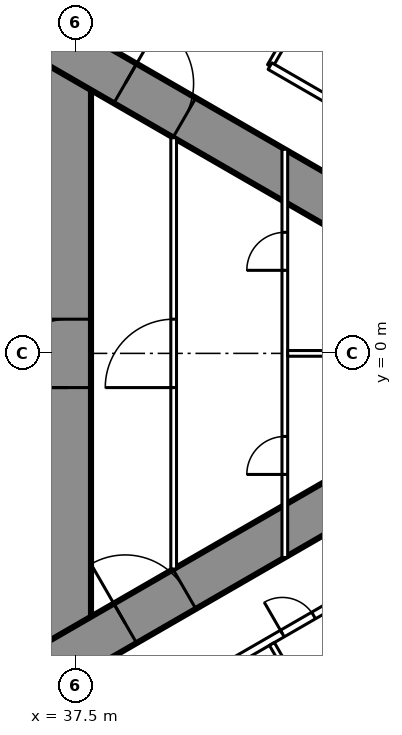
"""IFC4 building model, lengths in metres.
Left out: names, types, materials, properties, quantities, classifications, styles, units other than length and angle.
Written with IfcOpenShell. Run it as: python <this file> out.ifc"""

import sys

from ifc_helpers import new_model, si_unit, direction, frame, frame_2d, origin, place, context, subcontext, project, spatial, rectangle, extrude, element, fill, save


model = new_model("IFC4")
c1 = context("Model", 3, precision=1e-05, world=origin(), true_north=direction((0.0, 1.0)))
c2 = subcontext(c1, "Body", "Model", "MODEL_VIEW")
j1 = project(units=[si_unit("LENGTHUNIT", "METRE"), si_unit("PLANEANGLEUNIT", "RADIAN")], contexts=[c1])
p1 = place(None, origin())
s1 = spatial("IfcSite", under=j1, at=p1, CompositionType="ELEMENT")
p2 = place(p1, origin())
s2 = spatial("IfcBuilding", under=s1, at=p2, CompositionType="ELEMENT")
p3 = place(p2, frame((0.0, 0.0, 236.9)))
s3 = spatial("IfcBuildingStorey", under=s2, at=p3, CompositionType="ELEMENT", Elevation=236.9)
p4 = place(p3, frame((37.3, -8.6, 0.0), z_axis=(0.0, 0.0, 1.0), x_axis=(0.0, 1.0, 0.0)))
e1 = element("IfcWall", 1, at=p4, inside=s3, PredefinedType="SHEAR", context=c2, shape_type="SweptSolid", body=[
    extrude(rectangle(XDim=17.2, YDim=1.2, at=frame_2d((8.6, 0.0))), origin(), (0.0, 0.0, 1.0), 3.6),
])
p5 = place(p4, frame((7.7, 0.0, 0.0)))
e2 = element("IfcOpeningElement", 2, at=p5, cuts=e1, PredefinedType="OPENING", context=c2, shape_type="SweptSolid", body=[
    extrude(rectangle(XDim=1.8, YDim=2.2, at=frame_2d((0.9, 1.1))), frame((0.0, 0.61, 0.0), z_axis=(0.0, -1.0, 0.0), x_axis=(1.0, 0.0, 0.0)), (0.0, 0.0, 1.0), 1.22),
])
p6 = place(p3, frame((27.2, -13.8, 0.0), z_axis=(0.0, 0.0, 1.0), x_axis=(0.866027159892, 0.499996958321, 0.0)))
e3 = element("IfcWall", 3, at=p6, inside=s3, PredefinedType="SHEAR", context=c2, shape_type="SweptSolid", body=[
    extrude(rectangle(XDim=27.947, YDim=1.2, at=frame_2d((13.973, 0.0))), origin(), (0.0, 0.0, 1.0), 3.6),
])
p7 = place(p6, frame((4.6, 0.0, 0.0)))
e4 = element("IfcOpeningElement", 4, at=p7, cuts=e3, PredefinedType="OPENING", context=c2, shape_type="SweptSolid", body=[
    extrude(rectangle(XDim=1.0, YDim=2.2, at=frame_2d((0.5, 1.1))), frame((0.0, 0.61, 0.0), z_axis=(0.0, -1.0, 0.0), x_axis=(1.0, 0.0, 0.0)), (0.0, 0.0, 1.0), 1.22),
])
p8 = place(p6, frame((13.395, 0.0, 0.0)))
e5 = element("IfcOpeningElement", 5, at=p8, cuts=e3, PredefinedType="OPENING", context=c2, shape_type="SweptSolid", body=[
    extrude(rectangle(XDim=1.8, YDim=2.2, at=frame_2d((0.9, 1.1))), frame((0.0, 0.61, 0.0), z_axis=(0.0, -1.0, 0.0), x_axis=(1.0, 0.0, 0.0)), (0.0, 0.0, 1.0), 1.22),
])
p9 = place(p3, frame((27.2, 13.8, 0.0), z_axis=(0.0, 0.0, 1.0), x_axis=(0.866024515034, -0.500001539357, 0.0)))
e6 = element("IfcWall", 6, at=p9, inside=s3, PredefinedType="SHEAR", context=c2, shape_type="SweptSolid", body=[
    extrude(rectangle(XDim=26.907, YDim=1.2, at=frame_2d((13.454, 0.0))), origin(), (0.0, 0.0, 1.0), 3.6),
])
p10 = place(p9, frame((4.6, 0.0, 0.0)))
e7 = element("IfcOpeningElement", 7, at=p10, cuts=e6, PredefinedType="OPENING", context=c2, shape_type="SweptSolid", body=[
    extrude(rectangle(XDim=1.0, YDim=2.2, at=frame_2d((0.5, 1.1))), frame((0.0, 0.61, 0.0), z_axis=(0.0, -1.0, 0.0), x_axis=(1.0, 0.0, 0.0)), (0.0, 0.0, 1.0), 1.22),
])
p11 = place(p9, frame((13.395, 0.0, 0.0)))
e8 = element("IfcOpeningElement", 8, at=p11, cuts=e6, PredefinedType="OPENING", context=c2, shape_type="SweptSolid", body=[
    extrude(rectangle(XDim=1.8, YDim=2.2, at=frame_2d((0.9, 1.1))), frame((0.0, 0.61, 0.0), z_axis=(0.0, -1.0, 0.0), x_axis=(1.0, 0.0, 0.0)), (0.0, 0.0, 1.0), 1.22),
])
p12 = place(p3, frame((28.959, -15.44, 0.0), z_axis=(0.0, 0.0, 1.0), x_axis=(0.866025227435, 0.500000305447, 0.0)))
e9 = element("IfcWall", 9, at=p12, inside=s3, PredefinedType="PARTITIONING", context=c2, shape_type="SweptSolid", body=[
    extrude(rectangle(XDim=30.88, YDim=0.2, at=frame_2d((15.44, 0.0))), origin(), (0.0, 0.0, 1.0), 3.35),
])
p13 = place(p12, frame((1.494, 0.0, 0.0)))
e10 = element("IfcOpeningElement", 10, at=p13, cuts=e9, PredefinedType="OPENING", context=c2, shape_type="SweptSolid", body=[
    extrude(rectangle(XDim=1.8, YDim=2.03, at=frame_2d((0.9, 1.015))), frame((0.0, 0.11, 0.0), z_axis=(0.0, -1.0, 0.0), x_axis=(1.0, 0.0, 0.0)), (0.0, 0.0, 1.0), 0.22),
])
p14 = place(p12, frame((7.687, 0.0, 0.0)))
e11 = element("IfcOpeningElement", 11, at=p14, cuts=e9, PredefinedType="OPENING", context=c2, shape_type="SweptSolid", body=[
    extrude(rectangle(XDim=1.0, YDim=2.2, at=frame_2d((0.5, 1.1))), frame((0.0, 0.11, 0.0), z_axis=(0.0, -1.0, 0.0), x_axis=(1.0, 0.0, 0.0)), (0.0, 0.0, 1.0), 0.22),
])
p15 = place(p12, frame((16.137, 0.0, 0.0)))
e12 = element("IfcOpeningElement", 12, at=p15, cuts=e9, PredefinedType="OPENING", context=c2, shape_type="SweptSolid", body=[
    extrude(rectangle(XDim=0.95, YDim=2.2, at=frame_2d((0.475, 1.1))), frame((0.0, 0.11, 0.0), z_axis=(0.0, -1.0, 0.0), x_axis=(1.0, 0.0, 0.0)), (0.0, 0.0, 1.0), 0.22),
])
p16 = place(p12, frame((20.021, 0.0, 0.0)))
e13 = element("IfcOpeningElement", 13, at=p16, cuts=e9, PredefinedType="OPENING", context=c2, shape_type="SweptSolid", body=[
    extrude(rectangle(XDim=0.95, YDim=2.2, at=frame_2d((0.475, 1.1))), frame((0.0, 0.11, 0.0), z_axis=(0.0, -1.0, 0.0), x_axis=(1.0, 0.0, 0.0)), (0.0, 0.0, 1.0), 0.22),
])
p17 = place(p12, frame((26.253, 0.0, 0.0)))
e14 = element("IfcOpeningElement", 14, at=p17, cuts=e9, PredefinedType="OPENING", context=c2, shape_type="SweptSolid", body=[
    extrude(rectangle(XDim=0.95, YDim=2.2, at=frame_2d((0.475, 1.1))), frame((0.0, 0.11, 0.0), z_axis=(0.0, -1.0, 0.0), x_axis=(1.0, 0.0, 0.0)), (0.0, 0.0, 1.0), 0.22),
])
p18 = place(p3, frame((42.66, -7.646, 0.0), z_axis=(0.0, 0.0, 1.0), x_axis=(0.499996592859, -0.866027370889, 0.0)))
e15 = element("IfcWall", 15, at=p18, inside=s3, PredefinedType="PARTITIONING", context=c2, shape_type="SweptSolid", body=[
    extrude(rectangle(XDim=6.398, YDim=0.15, at=frame_2d((3.199, 0.0))), origin(), (0.0, 0.0, 1.0), 2.45),
])
p19 = place(p3, frame((42.61, 7.559, 0.0), z_axis=(0.0, 0.0, 1.0), x_axis=(0.500014058812, 0.866017286774, 0.0)))
e16 = element("IfcWall", 16, at=p19, inside=s3, PredefinedType="PARTITIONING", context=c2, shape_type="SweptSolid", body=[
    extrude(rectangle(XDim=6.498, YDim=0.15, at=frame_2d((3.249, 0.0))), origin(), (0.0, 0.0, 1.0), 2.45),
])
p20 = place(p3, frame((43.425, -8.821, 0.0), z_axis=(0.0, 0.0, 1.0), x_axis=(0.866006523861, 0.500032699561, 0.0)))
e17 = element("IfcWall", 17, at=p20, inside=s3, PredefinedType="PARTITIONING", context=c2, shape_type="SweptSolid", body=[
    extrude(rectangle(XDim=2.475, YDim=0.15, at=frame_2d((1.237, 0.0))), origin(), (0.0, 0.0, 1.0), 3.35),
])
p21 = place(p3, frame((42.61, 7.559, 0.0), z_axis=(0.0, 0.0, 1.0), x_axis=(0.866032081755, -0.499988433238, 0.0)))
e18 = element("IfcWall", 18, at=p21, inside=s3, PredefinedType="PARTITIONING", context=c2, shape_type="SweptSolid", body=[
    extrude(rectangle(XDim=4.741, YDim=0.2, at=frame_2d((2.37, 0.0))), origin(), (0.0, 0.0, 1.0), 3.35),
])
p22 = place(p21, frame((2.725, 0.0, 0.0)))
e19 = element("IfcOpeningElement", 19, at=p22, cuts=e18, PredefinedType="OPENING", context=c2, shape_type="SweptSolid", body=[
    extrude(rectangle(XDim=0.95, YDim=2.2, at=frame_2d((0.475, 1.1))), frame((0.0, 0.11, 0.0), z_axis=(0.0, -1.0, 0.0), x_axis=(1.0, 0.0, 0.0)), (0.0, 0.0, 1.0), 0.22),
])
p23 = place(p3, frame((40.075, -5.674, 0.0), z_axis=(0.0, 0.0, 1.0), x_axis=(0.0, 1.0, 0.0)))
e20 = element("IfcWall", 20, at=p23, inside=s3, PredefinedType="PARTITIONING", context=c2, shape_type="SweptSolid", body=[
    extrude(rectangle(XDim=11.348, YDim=0.15, at=frame_2d((5.674, 0.0))), origin(), (0.0, 0.0, 1.0), 3.35),
])
p24 = place(p23, frame((4.774, 0.0, 0.0)))
e21 = element("IfcOpeningElement", 21, at=p24, cuts=e20, PredefinedType="OPENING", context=c2, shape_type="SweptSolid", body=[
    extrude(rectangle(XDim=1.8, YDim=2.2, at=frame_2d((0.9, 1.1))), frame((0.0, 0.085, 0.0), z_axis=(0.0, -1.0, 0.0), x_axis=(1.0, 0.0, 0.0)), (0.0, 0.0, 1.0), 0.17),
])
p25 = place(p3, frame((43.0, -5.371, 0.0), z_axis=(0.0, 0.0, 1.0), x_axis=(0.0, 1.0, 0.0)))
e22 = element("IfcWall", 22, at=p25, inside=s3, PredefinedType="PARTITIONING", context=c2, shape_type="SweptSolid", body=[
    extrude(rectangle(XDim=10.741, YDim=0.15, at=frame_2d((5.371, 0.0))), origin(), (0.0, 0.0, 1.0), 3.35),
])
p26 = place(p25, frame((2.185, 0.0, 0.0)))
e23 = element("IfcOpeningElement", 23, at=p26, cuts=e22, PredefinedType="OPENING", context=c2, shape_type="SweptSolid", body=[
    extrude(rectangle(XDim=1.0, YDim=2.2, at=frame_2d((0.5, 1.1))), frame((0.0, 0.085, 0.0), z_axis=(0.0, -1.0, 0.0), x_axis=(1.0, 0.0, 0.0)), (0.0, 0.0, 1.0), 0.17),
])
p27 = place(p25, frame((7.556, 0.0, 0.0)))
e24 = element("IfcOpeningElement", 24, at=p27, cuts=e22, PredefinedType="OPENING", context=c2, shape_type="SweptSolid", body=[
    extrude(rectangle(XDim=1.0, YDim=2.2, at=frame_2d((0.5, 1.1))), frame((0.0, 0.085, 0.0), z_axis=(0.0, -1.0, 0.0), x_axis=(1.0, 0.0, 0.0)), (0.0, 0.0, 1.0), 0.17),
])
p28 = place(p3, frame((43.075, 0.0, 0.0), z_axis=(0.0, 0.0, 1.0), x_axis=(1.0, 0.0, 0.0)))
e25 = element("IfcWall", 25, at=p28, inside=s3, PredefinedType="PARTITIONING", context=c2, shape_type="SweptSolid", body=[
    extrude(rectangle(XDim=9.227, YDim=0.15, at=frame_2d((4.614, 0.0))), origin(), (0.0, 0.0, 1.0), 2.45),
])
p29 = place(p15, origin())
e26 = element("IfcDoor", 26, at=p29, inside=s3, OperationType="SINGLE_SWING_LEFT", PredefinedType="DOOR", context=c2, shape_type="SweptSolid", body=[
    extrude(rectangle(XDim=0.95, YDim=2.2, at=frame_2d((0.475, 1.1))), frame((0.0, 0.025, 0.0), z_axis=(0.0, -1.0, 0.0), x_axis=(1.0, 0.0, 0.0)), (0.0, 0.0, 1.0), 0.05),
])
fill(e12, e26)
p30 = place(p24, origin())
e27 = element("IfcDoor", 27, at=p30, inside=s3, OperationType="DOUBLE_DOOR_SINGLE_SWING", PredefinedType="DOOR", context=c2, shape_type="SweptSolid", body=[
    extrude(rectangle(XDim=1.8, YDim=2.2, at=frame_2d((0.9, 1.1))), frame((0.0, 0.025, 0.0), z_axis=(0.0, -1.0, 0.0), x_axis=(1.0, 0.0, 0.0)), (0.0, 0.0, 1.0), 0.05),
])
fill(e21, e27)
p31 = place(p26, origin())
e28 = element("IfcDoor", 28, at=p31, inside=s3, OperationType="SINGLE_SWING_LEFT", PredefinedType="DOOR", context=c2, shape_type="SweptSolid", body=[
    extrude(rectangle(XDim=1.0, YDim=2.2, at=frame_2d((0.5, 1.1))), frame((0.0, 0.025, 0.0), z_axis=(0.0, -1.0, 0.0), x_axis=(1.0, 0.0, 0.0)), (0.0, 0.0, 1.0), 0.05),
])
fill(e23, e28)
p32 = place(p27, origin())
e29 = element("IfcDoor", 29, at=p32, inside=s3, OperationType="SINGLE_SWING_LEFT", PredefinedType="DOOR", context=c2, shape_type="SweptSolid", body=[
    extrude(rectangle(XDim=1.0, YDim=2.2, at=frame_2d((0.5, 1.1))), frame((0.0, 0.025, 0.0), z_axis=(0.0, -1.0, 0.0), x_axis=(1.0, 0.0, 0.0)), (0.0, 0.0, 1.0), 0.05),
])
fill(e24, e29)
p33 = place(p8, origin())
e30 = element("IfcDoor", 30, at=p33, inside=s3, OperationType="DOUBLE_DOOR_SINGLE_SWING", PredefinedType="DOOR", context=c2, shape_type="SweptSolid", body=[
    extrude(rectangle(XDim=1.8, YDim=2.2, at=frame_2d((0.9, 1.1))), frame((0.0, 0.025, 0.0), z_axis=(0.0, -1.0, 0.0), x_axis=(1.0, 0.0, 0.0)), (0.0, 0.0, 1.0), 0.05),
])
fill(e5, e30)
p34 = place(p11, origin())
e31 = element("IfcDoor", 31, at=p34, inside=s3, OperationType="DOUBLE_DOOR_SINGLE_SWING", PredefinedType="DOOR", context=c2, shape_type="SweptSolid", body=[
    extrude(rectangle(XDim=1.8, YDim=2.2, at=frame_2d((0.9, 1.1))), frame((0.0, 0.025, 0.0), z_axis=(0.0, -1.0, 0.0), x_axis=(1.0, 0.0, 0.0)), (0.0, 0.0, 1.0), 0.05),
])
fill(e8, e31)
p35 = place(p5, origin())
e32 = element("IfcDoor", 32, at=p35, inside=s3, OperationType="DOUBLE_DOOR_SINGLE_SWING", PredefinedType="DOOR", context=c2, shape_type="SweptSolid", body=[
    extrude(rectangle(XDim=1.8, YDim=2.2, at=frame_2d((0.9, 1.1))), frame((0.0, 0.025, 0.0), z_axis=(0.0, -1.0, 0.0), x_axis=(1.0, 0.0, 0.0)), (0.0, 0.0, 1.0), 0.05),
])
fill(e2, e32)
save(model, sys.argv[1])
